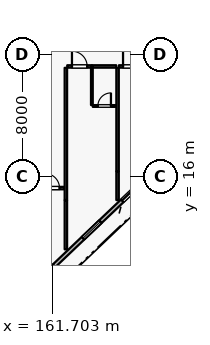
"""IFC4 building model, lengths in metres.
Left out: names, types, materials, properties, quantities, classifications, styles, units other than length and angle.
Written with IfcOpenShell. Run it as: python <this file> out.ifc"""

import sys

from ifc_helpers import new_model, si_unit, direction, frame, frame_2d, origin, place, context, subcontext, project, spatial, rectangle, extrude, element, fill, save


model = new_model("IFC4")
c1 = context("Model", 3, precision=1e-05, world=origin(), true_north=direction((0.0, 1.0)))
c2 = subcontext(c1, "Body", "Model", "MODEL_VIEW")
j1 = project(units=[si_unit("LENGTHUNIT", "METRE"), si_unit("PLANEANGLEUNIT", "RADIAN")], contexts=[c1])
p1 = place(None, origin())
s1 = spatial("IfcSite", under=j1, at=p1, CompositionType="ELEMENT")
p2 = place(p1, origin())
s2 = spatial("IfcBuilding", under=s1, at=p2, CompositionType="ELEMENT")
p3 = place(p2, frame((0.0, 0.0, 25.2)))
s3 = spatial("IfcBuildingStorey", under=s2, at=p3, CompositionType="ELEMENT", Elevation=25.2)
p4 = place(p3, frame((167.6, 15.619, 0.0), z_axis=(0.0, 0.0, 1.0), x_axis=(-0.724156739794, -0.689635422677, 0.0)))
e1 = element("IfcWall", 1, at=p4, inside=s3, PredefinedType="SOLIDWALL", context=c2, shape_type="SweptSolid", body=[
    extrude(rectangle(XDim=10.495, YDim=0.24, at=frame_2d((5.248, 0.0))), origin(), (0.0, 0.0, 1.0), 2.93),
])
p5 = place(p4, frame((0.286, 0.0, 0.0)))
e2 = element("IfcOpeningElement", 2, at=p5, cuts=e1, PredefinedType="OPENING", context=c2, shape_type="SweptSolid", body=[
    extrude(rectangle(XDim=1.5, YDim=2.25, at=frame_2d((0.75, 1.125))), frame((0.0, 0.13, 0.0), z_axis=(0.0, -1.0, 0.0), x_axis=(1.0, 0.0, 0.0)), (0.0, 0.0, 1.0), 0.26),
])
p6 = place(p4, frame((3.757, 0.0, 0.8)))
e3 = element("IfcOpeningElement", 3, at=p6, cuts=e1, PredefinedType="OPENING", context=c2, shape_type="SweptSolid", body=[
    extrude(rectangle(XDim=1.6, YDim=1.6, at=frame_2d((0.8, 0.8))), frame((0.0, 0.13, 0.0), z_axis=(0.0, -1.0, 0.0), x_axis=(1.0, 0.0, 0.0)), (0.0, 0.0, 1.0), 0.26),
])
p7 = place(p4, frame((7.969, 0.0, 0.8)))
e4 = element("IfcOpeningElement", 4, at=p7, cuts=e1, PredefinedType="OPENING", context=c2, shape_type="SweptSolid", body=[
    extrude(rectangle(XDim=1.6, YDim=1.6, at=frame_2d((0.8, 0.8))), frame((0.0, 0.13, 0.0), z_axis=(0.0, -1.0, 0.0), x_axis=(1.0, 0.0, 0.0)), (0.0, 0.0, 1.0), 0.26),
])
p8 = place(p3, frame((160.89, 15.23, 0.0), z_axis=(0.0, 0.0, 1.0), x_axis=(1.0, 0.0, 0.0)))
e5 = element("IfcWall", 5, at=p8, inside=s3, PredefinedType="PARTITIONING", context=c2, shape_type="SweptSolid", body=[
    extrude(rectangle(XDim=1.62, YDim=0.16, at=frame_2d((0.81, 0.0))), origin(), (0.0, 0.0, 1.0), 3.335),
])
p9 = place(p8, frame((0.33, 0.0, 0.0)))
e6 = element("IfcOpeningElement", 6, at=p9, cuts=e5, PredefinedType="OPENING", context=c2, shape_type="SweptSolid", body=[
    extrude(rectangle(XDim=0.96, YDim=2.2, at=frame_2d((0.48, 1.1))), frame((0.0, 0.09, 0.0), z_axis=(0.0, -1.0, 0.0), x_axis=(1.0, 0.0, 0.0)), (0.0, 0.0, 1.0), 0.18),
])
p10 = place(p3, frame((162.6, 11.2, 0.0), z_axis=(0.0, 0.0, 1.0), x_axis=(0.0, 1.0, 0.0)))
e7 = element("IfcWall", 7, at=p10, inside=s3, PredefinedType="PARTITIONING", context=c2, shape_type="SweptSolid", body=[
    extrude(rectangle(XDim=3.23, YDim=0.16, at=frame_2d((1.615, 0.0))), origin(), (0.0, 0.0, 1.0), 3.335),
])
p11 = place(p3, frame((162.69, 23.23, 0.0), z_axis=(0.0, 0.0, 1.0), x_axis=(1.0, 0.0, 0.0)))
e8 = element("IfcWall", 8, at=p11, inside=s3, PredefinedType="PARTITIONING", context=c2, shape_type="SweptSolid", body=[
    extrude(rectangle(XDim=1.62, YDim=0.16, at=frame_2d((0.81, 0.0))), origin(), (0.0, 0.0, 1.0), 3.335),
])
p12 = place(p11, frame((0.31, 0.0, 0.0)))
e9 = element("IfcOpeningElement", 9, at=p12, cuts=e8, PredefinedType="OPENING", context=c2, shape_type="SweptSolid", body=[
    extrude(rectangle(XDim=1.0, YDim=2.25, at=frame_2d((0.5, 1.125))), frame((0.0, 0.09, 0.0), z_axis=(0.0, -1.0, 0.0), x_axis=(1.0, 0.0, 0.0)), (0.0, 0.0, 1.0), 0.18),
])
p13 = place(p3, frame((164.32, 23.23, 0.0), z_axis=(0.0, 0.0, 1.0), x_axis=(1.0, 0.0, 0.0)))
e10 = element("IfcWall", 10, at=p13, inside=s3, PredefinedType="PARTITIONING", context=c2, shape_type="SweptSolid", body=[
    extrude(rectangle(XDim=1.59, YDim=0.16, at=frame_2d((0.795, 0.0))), origin(), (0.0, 0.0, 1.0), 3.335),
])
p14 = place(p3, frame((164.31, 20.69, 0.0), z_axis=(0.0, 0.0, 1.0), x_axis=(0.0, 1.0, 0.0)))
e11 = element("IfcWall", 11, at=p14, inside=s3, PredefinedType="PARTITIONING", context=c2, shape_type="SweptSolid", body=[
    extrude(rectangle(XDim=2.45, YDim=0.115, at=frame_2d((1.225, 0.0))), origin(), (0.0, 0.0, 1.0), 3.335),
])
p15 = place(p3, frame((164.37, 20.63, 0.0), z_axis=(0.0, 0.0, 1.0), x_axis=(1.0, 0.0, 0.0)))
e12 = element("IfcWall", 12, at=p15, inside=s3, PredefinedType="PARTITIONING", context=c2, shape_type="SweptSolid", body=[
    extrude(rectangle(XDim=1.53, YDim=0.115, at=frame_2d((0.765, 0.0))), origin(), (0.0, 0.0, 1.0), 3.335),
])
p16 = place(p15, frame((0.335, 0.0, 0.0)))
e13 = element("IfcOpeningElement", 13, at=p16, cuts=e12, PredefinedType="OPENING", context=c2, shape_type="SweptSolid", body=[
    extrude(rectangle(XDim=0.86, YDim=2.12, at=frame_2d((0.43, 1.06))), frame((0.0, 0.067, 0.0), z_axis=(0.0, -1.0, 0.0), x_axis=(1.0, 0.0, 0.0)), (0.0, 0.0, 1.0), 0.135),
])
p17 = place(p3, frame((162.6, 14.44, 0.0), z_axis=(0.0, 0.0, 1.0), x_axis=(0.0, 1.0, 0.0)))
e14 = element("IfcWall", 14, at=p17, inside=s3, PredefinedType="PARTITIONING", context=c2, shape_type="SweptSolid", body=[
    extrude(rectangle(XDim=8.7, YDim=0.16, at=frame_2d((4.35, 0.0))), origin(), (0.0, 0.0, 1.0), 3.335),
])
p18 = place(p3, frame((166.0, 14.44, 0.0), z_axis=(0.0, 0.0, 1.0), x_axis=(0.0, 1.0, 0.0)))
e15 = element("IfcWall", 15, at=p18, inside=s3, PredefinedType="PARTITIONING", context=c2, shape_type="SweptSolid", body=[
    extrude(rectangle(XDim=1.89, YDim=0.16, at=frame_2d((0.945, 0.0))), origin(), (0.0, 0.0, 1.0), 3.335),
])
p19 = place(p3, frame((166.09, 23.23, 0.0), z_axis=(0.0, 0.0, 1.0), x_axis=(1.0, 0.0, 0.0)))
e16 = element("IfcWall", 16, at=p19, inside=s3, PredefinedType="PARTITIONING", context=c2, shape_type="SweptSolid", body=[
    extrude(rectangle(XDim=1.62, YDim=0.16, at=frame_2d((0.81, 0.0))), origin(), (0.0, 0.0, 1.0), 3.335),
])
p20 = place(p19, frame((0.27, 0.0, 0.0)))
e17 = element("IfcOpeningElement", 17, at=p20, cuts=e16, PredefinedType="OPENING", context=c2, shape_type="SweptSolid", body=[
    extrude(rectangle(XDim=1.08, YDim=2.3, at=frame_2d((0.54, 1.15))), frame((0.0, 0.09, 0.0), z_axis=(0.0, -1.0, 0.0), x_axis=(1.0, 0.0, 0.0)), (0.0, 0.0, 1.0), 0.18),
])
p21 = place(p3, frame((166.0, 16.34, 0.0), z_axis=(0.0, 0.0, 1.0), x_axis=(0.0, 1.0, 0.0)))
e18 = element("IfcWall", 18, at=p21, inside=s3, PredefinedType="PARTITIONING", context=c2, shape_type="SweptSolid", body=[
    extrude(rectangle(XDim=6.8, YDim=0.16, at=frame_2d((3.4, 0.0))), origin(), (0.0, 0.0, 1.0), 3.335),
])
p22 = place(p5, origin())
e19 = element("IfcDoor", 19, at=p22, inside=s3, OperationType="SLIDING_TO_LEFT", PredefinedType="DOOR", context=c2, shape_type="SweptSolid", body=[
    extrude(rectangle(XDim=1.5, YDim=2.25, at=frame_2d((0.75, 1.125))), frame((0.0, 0.025, 0.0), z_axis=(0.0, -1.0, 0.0), x_axis=(1.0, 0.0, 0.0)), (0.0, 0.0, 1.0), 0.05),
])
fill(e2, e19)
p23 = place(p6, origin())
e20 = element("IfcWindow", 20, at=p23, inside=s3, PartitioningType="SINGLE_PANEL", PredefinedType="WINDOW", context=c2, shape_type="SweptSolid", body=[
    extrude(rectangle(XDim=1.6, YDim=1.6, at=frame_2d((0.8, 0.8))), frame((0.0, 0.03, 0.0), z_axis=(0.0, -1.0, 0.0), x_axis=(1.0, 0.0, 0.0)), (0.0, 0.0, 1.0), 0.06),
])
fill(e3, e20)
p24 = place(p7, origin())
e21 = element("IfcWindow", 21, at=p24, inside=s3, PartitioningType="SINGLE_PANEL", PredefinedType="WINDOW", context=c2, shape_type="SweptSolid", body=[
    extrude(rectangle(XDim=1.6, YDim=1.6, at=frame_2d((0.8, 0.8))), frame((0.0, 0.03, 0.0), z_axis=(0.0, -1.0, 0.0), x_axis=(1.0, 0.0, 0.0)), (0.0, 0.0, 1.0), 0.06),
])
fill(e4, e21)
p25 = place(p9, origin())
e22 = element("IfcDoor", 22, at=p25, inside=s3, OperationType="SINGLE_SWING_LEFT", PredefinedType="DOOR", context=c2, shape_type="SweptSolid", body=[
    extrude(rectangle(XDim=0.96, YDim=2.2, at=frame_2d((0.48, 1.1))), frame((0.0, 0.025, 0.0), z_axis=(0.0, -1.0, 0.0), x_axis=(1.0, 0.0, 0.0)), (0.0, 0.0, 1.0), 0.05),
])
fill(e6, e22)
p26 = place(p12, origin())
e23 = element("IfcDoor", 23, at=p26, inside=s3, OperationType="SINGLE_SWING_LEFT", PredefinedType="DOOR", context=c2, shape_type="SweptSolid", body=[
    extrude(rectangle(XDim=1.0, YDim=2.25, at=frame_2d((0.5, 1.125))), frame((0.0, 0.025, 0.0), z_axis=(0.0, -1.0, 0.0), x_axis=(1.0, 0.0, 0.0)), (0.0, 0.0, 1.0), 0.05),
])
fill(e9, e23)
p27 = place(p16, origin())
e24 = element("IfcDoor", 24, at=p27, inside=s3, OperationType="SINGLE_SWING_RIGHT", PredefinedType="DOOR", context=c2, shape_type="SweptSolid", body=[
    extrude(rectangle(XDim=0.86, YDim=2.12, at=frame_2d((0.43, 1.06))), frame((0.0, 0.025, 0.0), z_axis=(0.0, -1.0, 0.0), x_axis=(1.0, 0.0, 0.0)), (0.0, 0.0, 1.0), 0.05),
])
fill(e13, e24)
p28 = place(p20, origin())
e25 = element("IfcDoor", 25, at=p28, inside=s3, OperationType="SINGLE_SWING_LEFT", PredefinedType="DOOR", context=c2, shape_type="SweptSolid", body=[
    extrude(rectangle(XDim=1.08, YDim=2.3, at=frame_2d((0.54, 1.15))), frame((0.0, 0.025, 0.0), z_axis=(0.0, -1.0, 0.0), x_axis=(1.0, 0.0, 0.0)), (0.0, 0.0, 1.0), 0.05),
])
fill(e17, e25)
save(model, sys.argv[1])
